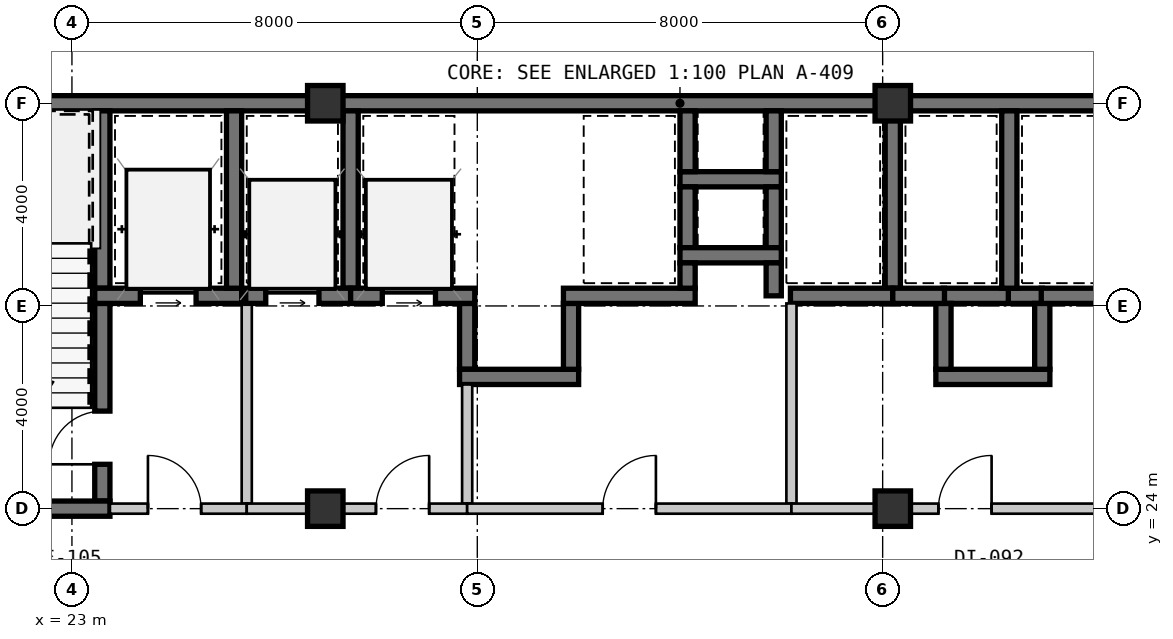
"""IFC4 building model, lengths in metres.
Left out: names, types, materials, properties, quantities, classifications, styles, units other than length and angle.
Written with IfcOpenShell. Run it as: python <this file> out.ifc"""

import sys

from ifc_helpers import new_model, si_unit, direction, frame, frame_2d, origin, origin_2d, place, context, subcontext, project, spatial, rectangle, extrude, source, transform, mapped, element, fill, save


model = new_model("IFC4")
c1 = context("Model", 3, precision=1e-05, world=origin(), true_north=direction((0.0, 1.0)))
c2 = subcontext(c1, "Body", "Model", "MODEL_VIEW")
j1 = project(units=[si_unit("LENGTHUNIT", "METRE"), si_unit("PLANEANGLEUNIT", "RADIAN")], contexts=[c1])
p1 = place(None, origin())
s1 = spatial("IfcSite", under=j1, at=p1, CompositionType="ELEMENT")
p2 = place(p1, origin())
s2 = spatial("IfcBuilding", under=s1, at=p2, CompositionType="ELEMENT")
p3 = place(p2, frame((0.0, 0.0, 87.15)))
s3 = spatial("IfcBuildingStorey", under=s2, at=p3, CompositionType="ELEMENT", Elevation=87.15)
m1 = source(origin(), c2, "Body", "SweptSolid", [
    extrude(rectangle(XDim=0.7, YDim=0.7, at=origin_2d()), origin(), (0.0, 0.0, 1.0), 3.15),
])
for number, where, z_axis, x_axis in (
    (1, (28.0, 24.0, 0.0), (0.0, 0.0, 1.0), (1.0, 0.0, 0.0)),
    (2, (39.2, 24.0, 0.0), (0.0, 0.0, 1.0), (1.0, 0.0, 0.0)),
    (3, (28.0, 32.0, 0.0), (0.0, 0.0, 1.0), (1.0, 0.0, 0.0)),
    (4, (39.2, 32.0, 0.0), (0.0, 0.0, 1.0), (1.0, 0.0, 0.0)),
):
    element("IfcColumn", number, at=place(p3, frame(where, z_axis=z_axis, x_axis=x_axis)), inside=s3, PredefinedType="COLUMN", context=c2, shape_type="MappedRepresentation", body=[
        mapped(m1, transform((0.0, 0.0, 0.0), scale=1.0)),
    ])
m2 = source(origin(), c2, "Body", "SweptSolid", [
    extrude(rectangle(XDim=9.15, YDim=0.3, at=frame_2d((4.575, 0.0))), origin(), (0.0, 0.0, 1.0), 2.93),
])
p4 = place(p3, frame((18.85, 32.0, 0.0), z_axis=(0.0, 0.0, 1.0), x_axis=(1.0, 0.0, 0.0)))
e5 = element("IfcWall", 5, at=p4, inside=s3, PredefinedType="SHEAR", context=c2, shape_type="MappedRepresentation", body=[
    mapped(m2, transform((0.0, 0.0, 0.0), scale=1.0)),
])
m3 = source(origin(), c2, "Body", "SweptSolid", [
    extrude(rectangle(XDim=11.2, YDim=0.3, at=frame_2d((5.6, 0.0))), origin(), (0.0, 0.0, 1.0), 2.93),
])
p5 = place(p3, frame((28.0, 32.0, 0.0), z_axis=(0.0, 0.0, 1.0), x_axis=(1.0, 0.0, 0.0)))
e6 = element("IfcWall", 6, at=p5, inside=s3, PredefinedType="SHEAR", context=c2, shape_type="MappedRepresentation", body=[
    mapped(m3, transform((0.0, 0.0, 0.0), scale=1.0)),
])
m4 = source(origin(), c2, "Body", "SweptSolid", [
    extrude(rectangle(XDim=11.95, YDim=0.3, at=frame_2d((5.975, 0.0))), origin(), (0.0, 0.0, 1.0), 2.93),
])
p6 = place(p3, frame((39.2, 32.0, 0.0), z_axis=(0.0, 0.0, 1.0), x_axis=(1.0, 0.0, 0.0)))
e7 = element("IfcWall", 7, at=p6, inside=s3, PredefinedType="SHEAR", context=c2, shape_type="MappedRepresentation", body=[
    mapped(m4, transform((0.0, 0.0, 0.0), scale=1.0)),
])
m5 = source(origin(), c2, "Body", "SweptSolid", [
    extrude(rectangle(XDim=3.5, YDim=0.3, at=frame_2d((1.75, 0.0))), origin(), (0.0, 0.0, 1.0), 2.93),
])
p7 = place(p3, frame((23.6, 28.35, 0.0), z_axis=(0.0, 0.0, 1.0), x_axis=(0.0, 1.0, 0.0)))
e8 = element("IfcWall", 8, at=p7, inside=s3, PredefinedType="SHEAR", context=c2, shape_type="MappedRepresentation", body=[
    mapped(m5, transform((0.0, 0.0, 0.0), scale=1.0)),
])
m6 = source(origin(), c2, "Body", "SweptSolid", [
    extrude(rectangle(XDim=3.9, YDim=0.3, at=frame_2d((1.95, 0.0))), origin(), (0.0, 0.0, 1.0), 2.93),
])
p8 = place(p3, frame((23.6, 24.15, 0.0), z_axis=(0.0, 0.0, 1.0), x_axis=(0.0, 1.0, 0.0)))
e9 = element("IfcWall", 9, at=p8, inside=s3, PredefinedType="SHEAR", context=c2, shape_type="MappedRepresentation", body=[
    mapped(m6, transform((0.0, 0.0, 0.0), scale=1.0)),
])
m7 = source(origin(), c2, "Body", "SweptSolid", [
    extrude(rectangle(XDim=1.05, YDim=2.1, at=frame_2d((0.525, 1.05))), frame((0.0, 0.16, 0.0), z_axis=(0.0, -1.0, 0.0), x_axis=(1.0, 0.0, 0.0)), (0.0, 0.0, 1.0), 0.32),
])
p9 = place(p8, frame((0.725, 0.0, 0.0)))
e10 = element("IfcOpeningElement", 10, at=p9, cuts=e9, PredefinedType="OPENING", context=c2, shape_type="MappedRepresentation", body=[
    mapped(m7, transform((0.0, 0.0, 0.0), scale=1.0)),
])
m8 = source(origin(), c2, "Body", "SweptSolid", [
    extrude(rectangle(XDim=4.9, YDim=0.3, at=frame_2d((2.45, 0.0))), origin(), (0.0, 0.0, 1.0), 2.93),
])
p10 = place(p3, frame((18.85, 24.0, 0.0), z_axis=(0.0, 0.0, 1.0), x_axis=(1.0, 0.0, 0.0)))
e11 = element("IfcWall", 11, at=p10, inside=s3, PredefinedType="SHEAR", context=c2, shape_type="MappedRepresentation", body=[
    mapped(m8, transform((0.0, 0.0, 0.0), scale=1.0)),
])
m9 = source(origin(), c2, "Body", "SweptSolid", [
    extrude(rectangle(XDim=2.9, YDim=0.3, at=frame_2d((1.45, 0.0))), origin(), (0.0, 0.0, 1.0), 2.93),
])
p11 = place(p3, frame((23.45, 28.2, 0.0), z_axis=(0.0, 0.0, 1.0), x_axis=(1.0, 0.0, 0.0)))
e12 = element("IfcWall", 12, at=p11, inside=s3, PredefinedType="SHEAR", context=c2, shape_type="MappedRepresentation", body=[
    mapped(m9, transform((0.0, 0.0, 0.0), scale=1.0)),
])
m10 = source(origin(), c2, "Body", "SweptSolid", [
    extrude(rectangle(XDim=1.1, YDim=2.15, at=frame_2d((0.55, 1.075))), frame((0.0, 0.16, 0.0), z_axis=(0.0, -1.0, 0.0), x_axis=(1.0, 0.0, 0.0)), (0.0, 0.0, 1.0), 0.32),
])
p12 = place(p11, frame((0.9, 0.0, 0.0)))
e13 = element("IfcOpeningElement", 13, at=p12, cuts=e12, PredefinedType="OPENING", context=c2, shape_type="MappedRepresentation", body=[
    mapped(m10, transform((0.0, 0.0, 0.0), scale=1.0)),
])
p13 = place(p3, frame((26.2, 28.35, 0.0), z_axis=(0.0, 0.0, 1.0), x_axis=(0.0, 1.0, 0.0)))
e14 = element("IfcWall", 14, at=p13, inside=s3, PredefinedType="SHEAR", context=c2, shape_type="MappedRepresentation", body=[
    mapped(m5, transform((0.0, 0.0, 0.0), scale=1.0)),
])
m11 = source(origin(), c2, "Body", "SweptSolid", [
    extrude(rectangle(XDim=3.95, YDim=0.2, at=frame_2d((1.975, 0.0))), origin(), (0.0, 0.0, 1.0), 2.93),
])
p14 = place(p3, frame((26.45, 24.1, 0.0), z_axis=(0.0, 0.0, 1.0), x_axis=(0.0, 1.0, 0.0)))
e15 = element("IfcWall", 15, at=p14, inside=s3, PredefinedType="SOLIDWALL", context=c2, shape_type="MappedRepresentation", body=[
    mapped(m11, transform((0.0, 0.0, 0.0), scale=1.0)),
])
m12 = source(origin(), c2, "Body", "SweptSolid", [
    extrude(rectangle(XDim=2.7, YDim=0.2, at=frame_2d((1.35, 0.0))), origin(), (0.0, 0.0, 1.0), 2.47),
])
p15 = place(p3, frame((23.75, 24.0, 0.0), z_axis=(0.0, 0.0, 1.0), x_axis=(1.0, 0.0, 0.0)))
e16 = element("IfcWall", 16, at=p15, inside=s3, PredefinedType="SOLIDWALL", context=c2, shape_type="MappedRepresentation", body=[
    mapped(m12, transform((0.0, 0.0, 0.0), scale=1.0)),
])
m13 = source(origin(), c2, "Body", "SweptSolid", [
    extrude(rectangle(XDim=1.05, YDim=2.1, at=frame_2d((0.525, 1.05))), frame((0.0, 0.11, 0.0), z_axis=(0.0, -1.0, 0.0), x_axis=(1.0, 0.0, 0.0)), (0.0, 0.0, 1.0), 0.22),
])
p16 = place(p15, frame((0.75, 0.0, 0.0)))
e17 = element("IfcOpeningElement", 17, at=p16, cuts=e16, PredefinedType="OPENING", context=c2, shape_type="MappedRepresentation", body=[
    mapped(m13, transform((0.0, 0.0, 0.0), scale=1.0)),
])
m14 = source(origin(), c2, "Body", "SweptSolid", [
    extrude(rectangle(XDim=2.0, YDim=0.3, at=frame_2d((1.0, 0.0))), origin(), (0.0, 0.0, 1.0), 2.93),
])
p17 = place(p3, frame((35.0, 30.5, 0.0), z_axis=(0.0, 0.0, 1.0), x_axis=(1.0, 0.0, 0.0)))
e18 = element("IfcWall", 18, at=p17, inside=s3, PredefinedType="SHEAR", context=c2, shape_type="MappedRepresentation", body=[
    mapped(m14, transform((0.0, 0.0, 0.0), scale=1.0)),
])
m15 = source(origin(), c2, "Body", "SweptSolid", [
    extrude(rectangle(XDim=1.2, YDim=0.3, at=frame_2d((0.6, 0.0))), origin(), (0.0, 0.0, 1.0), 2.93),
])
for number, where, z_axis, x_axis in (
    (19, (35.15, 31.85, 0.0), (0.0, 0.0, 1.0), (0.0, -1.0, 0.0)),
    (20, (36.85, 30.65, 0.0), (0.0, 0.0, 1.0), (0.0, 1.0, 0.0)),
    (21, (35.15, 30.35, 0.0), (0.0, 0.0, 1.0), (0.0, -1.0, 0.0)),
    (22, (36.85, 29.15, 0.0), (0.0, 0.0, 1.0), (0.0, 1.0, 0.0)),
):
    element("IfcWall", number, at=place(p3, frame(where, z_axis=z_axis, x_axis=x_axis)), inside=s3, PredefinedType="SHEAR", context=c2, shape_type="MappedRepresentation", body=[
        mapped(m15, transform((0.0, 0.0, 0.0), scale=1.0)),
    ])
p18 = place(p3, frame((35.0, 29.0, 0.0), z_axis=(0.0, 0.0, 1.0), x_axis=(1.0, 0.0, 0.0)))
e23 = element("IfcWall", 23, at=p18, inside=s3, PredefinedType="SHEAR", context=c2, shape_type="MappedRepresentation", body=[
    mapped(m14, transform((0.0, 0.0, 0.0), scale=1.0)),
])
m16 = source(origin(), c2, "Body", "SweptSolid", [
    extrude(rectangle(XDim=1.3, YDim=0.3, at=frame_2d((0.65, 0.0))), origin(), (0.0, 0.0, 1.0), 2.93),
])
p19 = place(p3, frame((30.8, 28.05, 0.0), z_axis=(0.0, 0.0, 1.0), x_axis=(0.0, -1.0, 0.0)))
e24 = element("IfcWall", 24, at=p19, inside=s3, PredefinedType="SHEAR", context=c2, shape_type="MappedRepresentation", body=[
    mapped(m16, transform((0.0, 0.0, 0.0), scale=1.0)),
])
m17 = source(origin(), c2, "Body", "SweptSolid", [
    extrude(rectangle(XDim=2.35, YDim=0.3, at=frame_2d((1.175, 0.0))), origin(), (0.0, 0.0, 1.0), 2.93),
])
p20 = place(p3, frame((30.65, 26.6, 0.0), z_axis=(0.0, 0.0, 1.0), x_axis=(1.0, 0.0, 0.0)))
e25 = element("IfcWall", 25, at=p20, inside=s3, PredefinedType="SHEAR", context=c2, shape_type="MappedRepresentation", body=[
    mapped(m17, transform((0.0, 0.0, 0.0), scale=1.0)),
])
p21 = place(p3, frame((32.85, 26.75, 0.0), z_axis=(0.0, 0.0, 1.0), x_axis=(0.0, 1.0, 0.0)))
e26 = element("IfcWall", 26, at=p21, inside=s3, PredefinedType="SHEAR", context=c2, shape_type="MappedRepresentation", body=[
    mapped(m16, transform((0.0, 0.0, 0.0), scale=1.0)),
])
m18 = source(origin(), c2, "Body", "SweptSolid", [
    extrude(rectangle(XDim=1.32, YDim=0.3, at=frame_2d((0.66, 0.0))), origin(), (0.0, 0.0, 1.0), 2.93),
])
p22 = place(p3, frame((41.52, 28.2, 0.0), z_axis=(0.0, 0.0, 1.0), x_axis=(-1.0, 0.0, 0.0)))
e27 = element("IfcWall", 27, at=p22, inside=s3, PredefinedType="SHEAR", context=c2, shape_type="MappedRepresentation", body=[
    mapped(m18, transform((0.0, 0.0, 0.0), scale=1.0)),
])
m19 = source(origin(), c2, "Body", "SweptSolid", [
    extrude(rectangle(XDim=0.67, YDim=0.3, at=frame_2d((0.335, 0.0))), origin(), (0.0, 0.0, 1.0), 2.93),
])
p23 = place(p3, frame((42.15, 28.2, 0.0), z_axis=(0.0, 0.0, 1.0), x_axis=(-1.0, 0.0, 0.0)))
e28 = element("IfcWall", 28, at=p23, inside=s3, PredefinedType="SHEAR", context=c2, shape_type="MappedRepresentation", body=[
    mapped(m19, transform((0.0, 0.0, 0.0), scale=1.0)),
])
m20 = source(origin(), c2, "Body", "SweptSolid", [
    extrude(rectangle(XDim=2.25, YDim=0.3, at=frame_2d((1.125, 0.0))), origin(), (0.0, 0.0, 1.0), 2.93),
])
p24 = place(p3, frame((40.05, 26.6, 0.0), z_axis=(0.0, 0.0, 1.0), x_axis=(1.0, 0.0, 0.0)))
e29 = element("IfcWall", 29, at=p24, inside=s3, PredefinedType="SHEAR", context=c2, shape_type="MappedRepresentation", body=[
    mapped(m20, transform((0.0, 0.0, 0.0), scale=1.0)),
])
for number, where, z_axis, x_axis in (
    (30, (40.2, 28.05, 0.0), (0.0, 0.0, 1.0), (0.0, -1.0, 0.0)),
    (31, (42.15, 26.75, 0.0), (0.0, 0.0, 1.0), (0.0, 1.0, 0.0)),
):
    element("IfcWall", number, at=place(p3, frame(where, z_axis=z_axis, x_axis=x_axis)), inside=s3, PredefinedType="SHEAR", context=c2, shape_type="MappedRepresentation", body=[
        mapped(m16, transform((0.0, 0.0, 0.0), scale=1.0)),
    ])
p25 = place(p3, frame((28.5, 28.35, 0.0), z_axis=(0.0, 0.0, 1.0), x_axis=(0.0, 1.0, 0.0)))
e32 = element("IfcWall", 32, at=p25, inside=s3, PredefinedType="SHEAR", context=c2, shape_type="MappedRepresentation", body=[
    mapped(m5, transform((0.0, 0.0, 0.0), scale=1.0)),
])
m21 = source(origin(), c2, "Body", "SweptSolid", [
    extrude(rectangle(XDim=2.07, YDim=0.3, at=frame_2d((1.035, 0.0))), origin(), (0.0, 0.0, 1.0), 2.93),
])
p26 = place(p3, frame((26.43, 28.2, 0.0), z_axis=(0.0, 0.0, 1.0), x_axis=(1.0, 0.0, 0.0)))
e33 = element("IfcWall", 33, at=p26, inside=s3, PredefinedType="SHEAR", context=c2, shape_type="MappedRepresentation", body=[
    mapped(m21, transform((0.0, 0.0, 0.0), scale=1.0)),
])
m22 = source(origin(), c2, "Body", "SweptSolid", [
    extrude(rectangle(XDim=1.05, YDim=2.15, at=frame_2d((0.525, 1.075))), frame((0.0, 0.16, 0.0), z_axis=(0.0, -1.0, 0.0), x_axis=(1.0, 0.0, 0.0)), (0.0, 0.0, 1.0), 0.32),
])
p27 = place(p26, frame((0.395, 0.0, 0.0)))
e34 = element("IfcOpeningElement", 34, at=p27, cuts=e33, PredefinedType="OPENING", context=c2, shape_type="MappedRepresentation", body=[
    mapped(m22, transform((0.0, 0.0, 0.0), scale=1.0)),
])
m23 = source(origin(), c2, "Body", "SweptSolid", [
    extrude(rectangle(XDim=2.45, YDim=0.3, at=frame_2d((1.225, 0.0))), origin(), (0.0, 0.0, 1.0), 2.93),
])
p28 = place(p3, frame((28.5, 28.2, 0.0), z_axis=(0.0, 0.0, 1.0), x_axis=(1.0, 0.0, 0.0)))
e35 = element("IfcWall", 35, at=p28, inside=s3, PredefinedType="SHEAR", context=c2, shape_type="MappedRepresentation", body=[
    mapped(m23, transform((0.0, 0.0, 0.0), scale=1.0)),
])
p29 = place(p28, frame((0.625, 0.0, 0.0)))
e36 = element("IfcOpeningElement", 36, at=p29, cuts=e35, PredefinedType="OPENING", context=c2, shape_type="MappedRepresentation", body=[
    mapped(m22, transform((0.0, 0.0, 0.0), scale=1.0)),
])
m24 = source(origin(), c2, "Body", "SweptSolid", [
    extrude(rectangle(XDim=2.35, YDim=0.2, at=frame_2d((1.175, 0.0))), origin(), (0.0, 0.0, 1.0), 2.93),
])
p30 = place(p3, frame((30.8, 26.45, 0.0), z_axis=(0.0, 0.0, 1.0), x_axis=(0.0, -1.0, 0.0)))
e37 = element("IfcWall", 37, at=p30, inside=s3, PredefinedType="SOLIDWALL", context=c2, shape_type="MappedRepresentation", body=[
    mapped(m24, transform((0.0, 0.0, 0.0), scale=1.0)),
])
m25 = source(origin(), c2, "Body", "SweptSolid", [
    extrude(rectangle(XDim=4.35, YDim=0.2, at=frame_2d((2.175, 0.0))), origin(), (0.0, 0.0, 1.0), 2.47),
])
p31 = place(p3, frame((30.8, 24.0, 0.0), z_axis=(0.0, 0.0, 1.0), x_axis=(-1.0, 0.0, 0.0)))
e38 = element("IfcWall", 38, at=p31, inside=s3, PredefinedType="SOLIDWALL", context=c2, shape_type="MappedRepresentation", body=[
    mapped(m25, transform((0.0, 0.0, 0.0), scale=1.0)),
])
p32 = place(p31, frame((0.75, 0.0, 0.0)))
e39 = element("IfcOpeningElement", 39, at=p32, cuts=e38, PredefinedType="OPENING", context=c2, shape_type="MappedRepresentation", body=[
    mapped(m13, transform((0.0, 0.0, 0.0), scale=1.0)),
])
m26 = source(origin(), c2, "Body", "SweptSolid", [
    extrude(rectangle(XDim=2.6, YDim=0.3, at=frame_2d((1.3, 0.0))), origin(), (0.0, 0.0, 1.0), 2.93),
])
p33 = place(p3, frame((32.7, 28.2, 0.0), z_axis=(0.0, 0.0, 1.0), x_axis=(1.0, 0.0, 0.0)))
e40 = element("IfcWall", 40, at=p33, inside=s3, PredefinedType="SHEAR", context=c2, shape_type="MappedRepresentation", body=[
    mapped(m26, transform((0.0, 0.0, 0.0), scale=1.0)),
])
m27 = source(origin(), c2, "Body", "SweptSolid", [
    extrude(rectangle(XDim=0.5, YDim=0.3, at=frame_2d((0.25, 0.0))), origin(), (0.0, 0.0, 1.0), 2.93),
])
p34 = place(p3, frame((35.15, 28.35, 0.0), z_axis=(0.0, 0.0, 1.0), x_axis=(0.0, 1.0, 0.0)))
e41 = element("IfcWall", 41, at=p34, inside=s3, PredefinedType="SHEAR", context=c2, shape_type="MappedRepresentation", body=[
    mapped(m27, transform((0.0, 0.0, 0.0), scale=1.0)),
])
p35 = place(p3, frame((39.2, 28.35, 0.0), z_axis=(0.0, 0.0, 1.0), x_axis=(0.0, 1.0, 0.0)))
e42 = element("IfcWall", 42, at=p35, inside=s3, PredefinedType="SHEAR", context=c2, shape_type="MappedRepresentation", body=[
    mapped(m5, transform((0.0, 0.0, 0.0), scale=1.0)),
])
m28 = source(origin(), c2, "Body", "SweptSolid", [
    extrude(rectangle(XDim=0.65, YDim=0.3, at=frame_2d((0.325, 0.0))), origin(), (0.0, 0.0, 1.0), 2.93),
])
p36 = place(p3, frame((36.85, 28.85, 0.0), z_axis=(0.0, 0.0, 1.0), x_axis=(0.0, -1.0, 0.0)))
e43 = element("IfcWall", 43, at=p36, inside=s3, PredefinedType="SHEAR", context=c2, shape_type="MappedRepresentation", body=[
    mapped(m28, transform((0.0, 0.0, 0.0), scale=1.0)),
])
m29 = source(origin(), c2, "Body", "SweptSolid", [
    extrude(rectangle(XDim=2.02, YDim=0.3, at=frame_2d((1.01, 0.0))), origin(), (0.0, 0.0, 1.0), 2.93),
])
p37 = place(p3, frame((37.18, 28.2, 0.0), z_axis=(0.0, 0.0, 1.0), x_axis=(1.0, 0.0, 0.0)))
e44 = element("IfcWall", 44, at=p37, inside=s3, PredefinedType="SHEAR", context=c2, shape_type="MappedRepresentation", body=[
    mapped(m29, transform((0.0, 0.0, 0.0), scale=1.0)),
])
p38 = place(p3, frame((41.5, 28.35, 0.0), z_axis=(0.0, 0.0, 1.0), x_axis=(0.0, 1.0, 0.0)))
e45 = element("IfcWall", 45, at=p38, inside=s3, PredefinedType="SHEAR", context=c2, shape_type="MappedRepresentation", body=[
    mapped(m5, transform((0.0, 0.0, 0.0), scale=1.0)),
])
m30 = source(origin(), c2, "Body", "SweptSolid", [
    extrude(rectangle(XDim=1.02, YDim=0.3, at=frame_2d((0.51, 0.0))), origin(), (0.0, 0.0, 1.0), 2.93),
])
p39 = place(p3, frame((39.2, 28.2, 0.0), z_axis=(0.0, 0.0, 1.0), x_axis=(1.0, 0.0, 0.0)))
e46 = element("IfcWall", 46, at=p39, inside=s3, PredefinedType="SHEAR", context=c2, shape_type="MappedRepresentation", body=[
    mapped(m30, transform((0.0, 0.0, 0.0), scale=1.0)),
])
m31 = source(origin(), c2, "Body", "SweptSolid", [
    extrude(rectangle(XDim=1.44, YDim=0.3, at=frame_2d((0.72, 0.0))), origin(), (0.0, 0.0, 1.0), 2.93),
])
p40 = place(p3, frame((42.13, 28.2, 0.0), z_axis=(0.0, 0.0, 1.0), x_axis=(1.0, 0.0, 0.0)))
e47 = element("IfcWall", 47, at=p40, inside=s3, PredefinedType="SHEAR", context=c2, shape_type="MappedRepresentation", body=[
    mapped(m31, transform((0.0, 0.0, 0.0), scale=1.0)),
])
p41 = place(p3, frame((37.2, 28.05, 0.0), z_axis=(0.0, 0.0, 1.0), x_axis=(0.0, -1.0, 0.0)))
e48 = element("IfcWall", 48, at=p41, inside=s3, PredefinedType="SOLIDWALL", context=c2, shape_type="MappedRepresentation", body=[
    mapped(m11, transform((0.0, 0.0, 0.0), scale=1.0)),
])
m32 = source(origin(), c2, "Body", "SweptSolid", [
    extrude(rectangle(XDim=6.4, YDim=0.2, at=frame_2d((3.2, 0.0))), origin(), (0.0, 0.0, 1.0), 2.47),
])
p42 = place(p3, frame((37.2, 24.0, 0.0), z_axis=(0.0, 0.0, 1.0), x_axis=(-1.0, 0.0, 0.0)))
e49 = element("IfcWall", 49, at=p42, inside=s3, PredefinedType="SOLIDWALL", context=c2, shape_type="MappedRepresentation", body=[
    mapped(m32, transform((0.0, 0.0, 0.0), scale=1.0)),
])
p43 = place(p42, frame((2.675, 0.0, 0.0)))
e50 = element("IfcOpeningElement", 50, at=p43, cuts=e49, PredefinedType="OPENING", context=c2, shape_type="MappedRepresentation", body=[
    mapped(m13, transform((0.0, 0.0, 0.0), scale=1.0)),
])
m33 = source(origin(), c2, "Body", "SweptSolid", [
    extrude(rectangle(XDim=4.35, YDim=0.2, at=frame_2d((2.175, 0.0))), origin(), (0.0, 0.0, 1.0), 2.397),
])
p44 = place(p3, frame((43.55, 24.0, 0.0), z_axis=(0.0, 0.0, 1.0), x_axis=(-1.0, 0.0, 0.0)))
e51 = element("IfcWall", 51, at=p44, inside=s3, PredefinedType="SOLIDWALL", context=c2, shape_type="MappedRepresentation", body=[
    mapped(m33, transform((0.0, 0.0, 0.0), scale=1.0)),
])
p45 = place(p44, frame((2.4, 0.0, 0.0)))
e52 = element("IfcOpeningElement", 52, at=p45, cuts=e51, PredefinedType="OPENING", context=c2, shape_type="MappedRepresentation", body=[
    mapped(m13, transform((0.0, 0.0, 0.0), scale=1.0)),
])
m34 = source(origin(), c2, "Body", "SweptSolid", [
    extrude(rectangle(XDim=2.0, YDim=0.2, at=frame_2d((1.0, 0.0))), origin(), (0.0, 0.0, 1.0), 2.47),
])
p46 = place(p3, frame((39.2, 24.0, 0.0), z_axis=(0.0, 0.0, 1.0), x_axis=(-1.0, 0.0, 0.0)))
e53 = element("IfcWall", 53, at=p46, inside=s3, PredefinedType="SOLIDWALL", context=c2, shape_type="MappedRepresentation", body=[
    mapped(m34, transform((0.0, 0.0, 0.0), scale=1.0)),
])
m35 = source(origin(), c2, "Body", "SweptSolid", [
    extrude(rectangle(XDim=1.05, YDim=2.1, at=frame_2d((0.525, 1.05))), frame((0.0, 0.025, 0.0), z_axis=(0.0, -1.0, 0.0), x_axis=(1.0, 0.0, 0.0)), (0.0, 0.0, 1.0), 0.05),
])
p47 = place(p9, origin())
e54 = element("IfcDoor", 54, at=p47, inside=s3, OperationType="SINGLE_SWING_LEFT", PredefinedType="DOOR", context=c2, shape_type="MappedRepresentation", body=[
    mapped(m35, transform((0.0, 0.0, 0.0), scale=1.0)),
])
fill(e10, e54)
m36 = source(origin(), c2, "Body", "SweptSolid", [
    extrude(rectangle(XDim=1.1, YDim=2.15, at=frame_2d((0.55, 1.075))), frame((0.0, 0.025, 0.0), z_axis=(0.0, -1.0, 0.0), x_axis=(1.0, 0.0, 0.0)), (0.0, 0.0, 1.0), 0.05),
])
p48 = place(p12, origin())
e55 = element("IfcDoor", 55, at=p48, inside=s3, OperationType="SLIDING_TO_LEFT", PredefinedType="DOOR", context=c2, shape_type="MappedRepresentation", body=[
    mapped(m36, transform((0.0, 0.0, 0.0), scale=1.0)),
])
fill(e13, e55)
p49 = place(p16, origin())
e56 = element("IfcDoor", 56, at=p49, inside=s3, OperationType="SINGLE_SWING_LEFT", PredefinedType="DOOR", context=c2, shape_type="MappedRepresentation", body=[
    mapped(m35, transform((0.0, 0.0, 0.0), scale=1.0)),
])
fill(e17, e56)
m37 = source(origin(), c2, "Body", "SweptSolid", [
    extrude(rectangle(XDim=1.05, YDim=2.15, at=frame_2d((0.525, 1.075))), frame((0.0, 0.025, 0.0), z_axis=(0.0, -1.0, 0.0), x_axis=(1.0, 0.0, 0.0)), (0.0, 0.0, 1.0), 0.05),
])
p50 = place(p27, origin())
e57 = element("IfcDoor", 57, at=p50, inside=s3, OperationType="SLIDING_TO_LEFT", PredefinedType="DOOR", context=c2, shape_type="MappedRepresentation", body=[
    mapped(m37, transform((0.0, 0.0, 0.0), scale=1.0)),
])
fill(e34, e57)
p51 = place(p29, origin())
e58 = element("IfcDoor", 58, at=p51, inside=s3, OperationType="SLIDING_TO_LEFT", PredefinedType="DOOR", context=c2, shape_type="MappedRepresentation", body=[
    mapped(m37, transform((0.0, 0.0, 0.0), scale=1.0)),
])
fill(e36, e58)
p52 = place(p32, frame((1.05, 0.0, 0.0), z_axis=(0.0, 0.0, 1.0), x_axis=(-1.0, 0.0, 0.0)))
e59 = element("IfcDoor", 59, at=p52, inside=s3, OperationType="SINGLE_SWING_RIGHT", PredefinedType="DOOR", context=c2, shape_type="MappedRepresentation", body=[
    mapped(m35, transform((0.0, 0.0, 0.0), scale=1.0)),
])
fill(e39, e59)
p53 = place(p43, frame((1.05, 0.0, 0.0), z_axis=(0.0, 0.0, 1.0), x_axis=(-1.0, 0.0, 0.0)))
e60 = element("IfcDoor", 60, at=p53, inside=s3, OperationType="SINGLE_SWING_RIGHT", PredefinedType="DOOR", context=c2, shape_type="MappedRepresentation", body=[
    mapped(m35, transform((0.0, 0.0, 0.0), scale=1.0)),
])
fill(e50, e60)
p54 = place(p45, frame((1.05, 0.0, 0.0), z_axis=(0.0, 0.0, 1.0), x_axis=(-1.0, 0.0, 0.0)))
e61 = element("IfcDoor", 61, at=p54, inside=s3, OperationType="SINGLE_SWING_RIGHT", PredefinedType="DOOR", context=c2, shape_type="MappedRepresentation", body=[
    mapped(m35, transform((0.0, 0.0, 0.0), scale=1.0)),
])
fill(e52, e61)
save(model, sys.argv[1])
